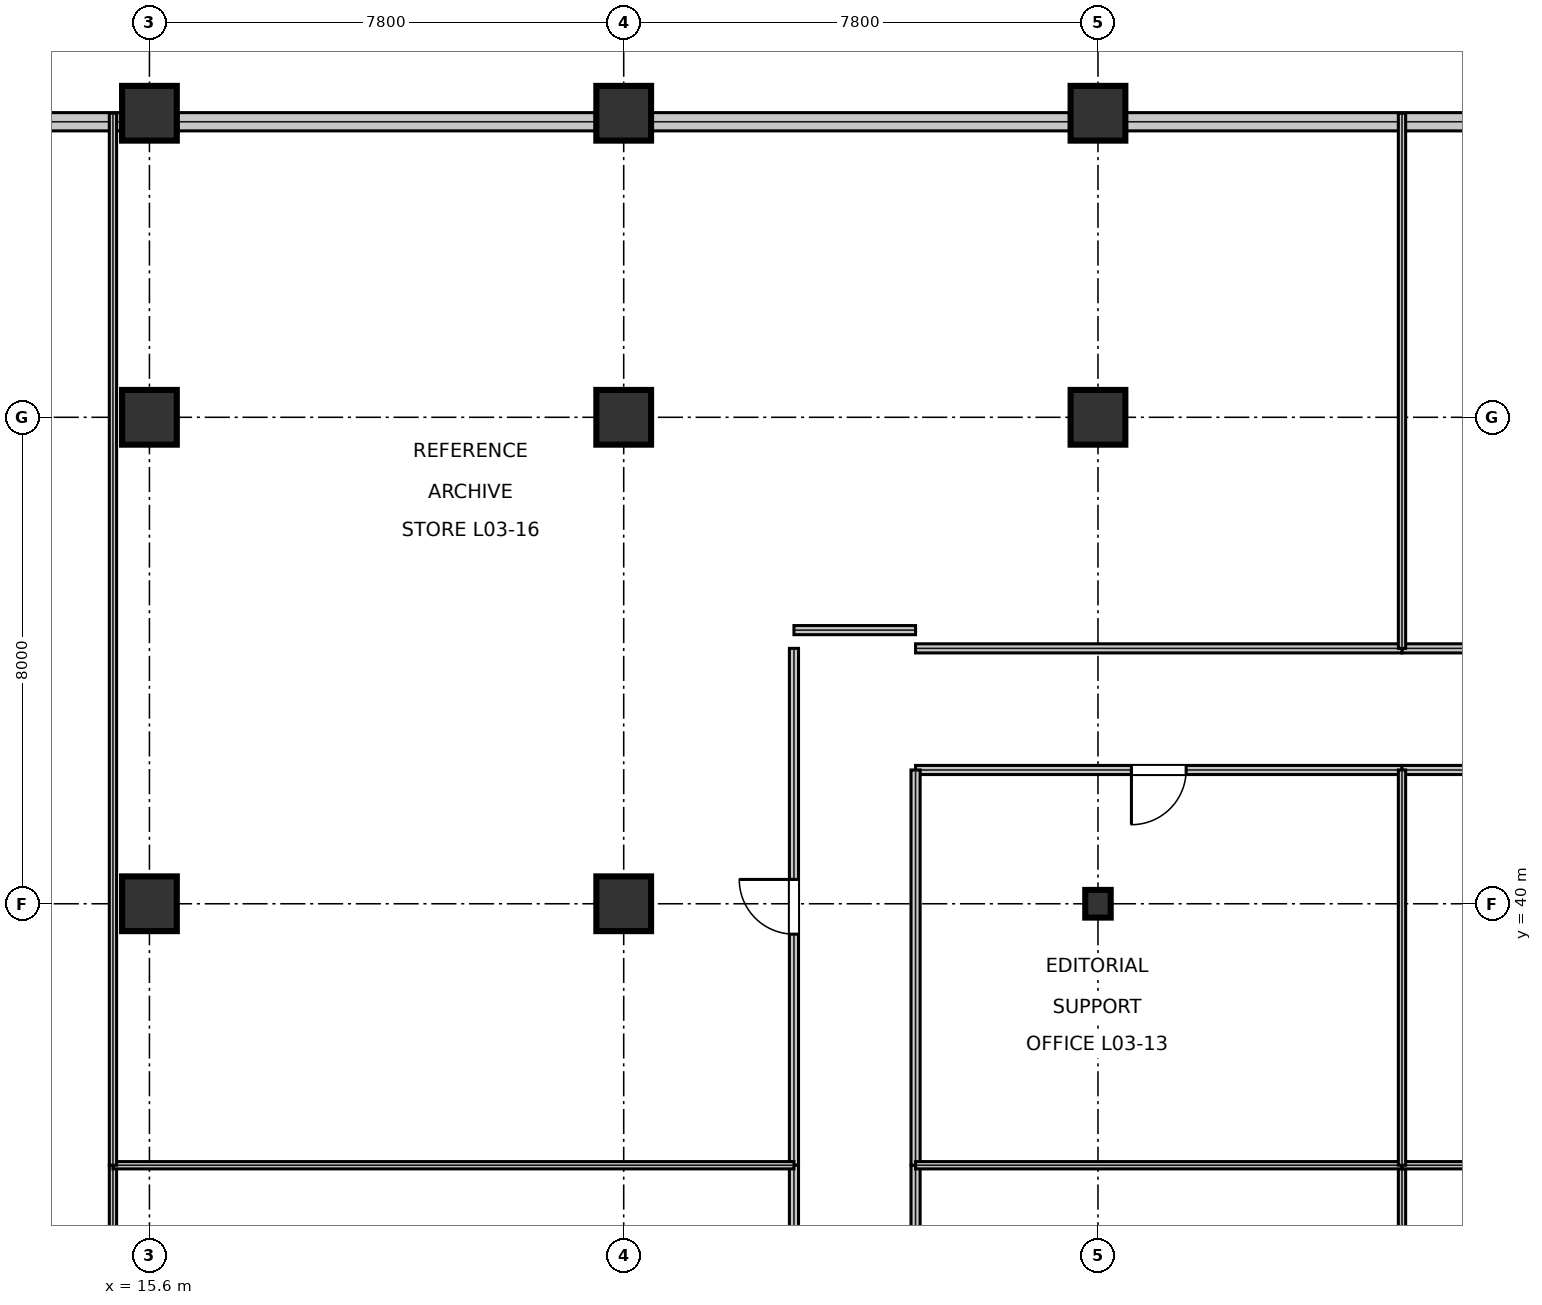
"""IFC4 building model, lengths in metres.
Left out: names, types, materials, properties, quantities, classifications, styles, units other than length and angle.
Written with IfcOpenShell. Run it as: python <this file> out.ifc"""

import sys

from ifc_helpers import new_model, si_unit, direction, frame, frame_2d, origin, origin_2d, place, context, subcontext, project, spatial, rectangle, i_section, extrude, element, fill, save


model = new_model("IFC4")
c1 = context("Model", 3, precision=1e-05, world=origin(), true_north=direction((0.0, 1.0)))
c2 = subcontext(c1, "Body", "Model", "MODEL_VIEW")
j1 = project(units=[si_unit("LENGTHUNIT", "METRE"), si_unit("PLANEANGLEUNIT", "RADIAN")], contexts=[c1])
p1 = place(None, origin())
s1 = spatial("IfcSite", under=j1, at=p1, CompositionType="ELEMENT")
p2 = place(p1, origin())
s2 = spatial("IfcBuilding", under=s1, at=p2, CompositionType="ELEMENT")
p3 = place(p2, frame((0.0, 0.0, 16.2)))
s3 = spatial("IfcBuildingStorey", under=s2, at=p3, CompositionType="ELEMENT", Elevation=16.2)
for number, where, z_axis, x_axis in (
    (1, (15.6, 40.0, 0.0), (0.0, 0.0, 1.0), (1.0, 0.0, 0.0)),
    (2, (15.6, 48.0, 0.0), (0.0, 0.0, 1.0), (1.0, 0.0, 0.0)),
    (3, (15.6, 53.0, 0.0), (0.0, 0.0, 1.0), (1.0, 0.0, 0.0)),
    (4, (23.4, 40.0, 0.0), (0.0, 0.0, 1.0), (1.0, 0.0, 0.0)),
    (5, (23.4, 48.0, 0.0), (0.0, 0.0, 1.0), (1.0, 0.0, 0.0)),
    (6, (23.4, 53.0, 0.0), (0.0, 0.0, 1.0), (1.0, 0.0, 0.0)),
):
    element("IfcColumn", number, at=place(p3, frame(where, z_axis=z_axis, x_axis=x_axis)), inside=s3, PredefinedType="COLUMN", context=c2, shape_type="SweptSolid", body=[
        extrude(rectangle(XDim=0.9, YDim=0.9, at=origin_2d()), origin(), (0.0, 0.0, 1.0), 5.395),
    ])
p4 = place(p3, frame((31.2, 40.0, 0.0), z_axis=(0.0, 0.0, 1.0), x_axis=(1.0, 0.0, 0.0)))
e7 = element("IfcColumn", 7, at=p4, inside=s3, PredefinedType="COLUMN", context=c2, shape_type="SweptSolid", body=[
    extrude(i_section(OverallWidth=0.418, OverallDepth=0.455, WebThickness=0.042, FlangeThickness=0.068, at=origin_2d()), origin(), (0.0, 0.0, 1.0), 5.395),
])
for number, where, z_axis, x_axis in (
    (8, (31.2, 48.0, 0.0), (0.0, 0.0, 1.0), (1.0, 0.0, 0.0)),
    (9, (31.2, 53.0, 0.0), (0.0, 0.0, 1.0), (1.0, 0.0, 0.0)),
):
    element("IfcColumn", number, at=place(p3, frame(where, z_axis=z_axis, x_axis=x_axis)), inside=s3, PredefinedType="COLUMN", context=c2, shape_type="SweptSolid", body=[
        extrude(rectangle(XDim=0.9, YDim=0.9, at=origin_2d()), origin(), (0.0, 0.0, 1.0), 5.395),
    ])
for number, where, z_axis, x_axis in (
    (10, (38.532, 52.86, 0.0), (0.0, 0.0, 1.0), (-1.0, 0.0, 0.0)),
    (11, (30.732, 52.86, 0.0), (0.0, 0.0, 1.0), (-1.0, 0.0, 0.0)),
):
    element("IfcWall", number, at=place(p3, frame(where, z_axis=z_axis, x_axis=x_axis)), inside=s3, PredefinedType="STANDARD", context=c2, shape_type="SweptSolid", body=[
        extrude(rectangle(XDim=6.864, YDim=0.3, at=frame_2d((3.432, 0.0))), origin(), (0.0, 0.0, 1.0), 4.648),
    ])
p5 = place(p3, frame((22.932, 52.86, 0.0), z_axis=(0.0, 0.0, 1.0), x_axis=(-1.0, 0.0, 0.0)))
e12 = element("IfcWall", 12, at=p5, inside=s3, PredefinedType="STANDARD", context=c2, shape_type="SweptSolid", body=[
    extrude(rectangle(XDim=6.864, YDim=0.3, at=frame_2d((3.432, 0.0))), origin(), (0.0, 0.0, 1.0), 4.648),
])
p6 = place(p3, frame((15.132, 52.86, 0.0), z_axis=(0.0, 0.0, 1.0), x_axis=(-1.0, 0.0, 0.0)))
e13 = element("IfcWall", 13, at=p6, inside=s3, PredefinedType="STANDARD", context=c2, shape_type="SweptSolid", body=[
    extrude(rectangle(XDim=6.864, YDim=0.3, at=frame_2d((3.432, 0.0))), origin(), (0.0, 0.0, 1.0), 4.648),
])
p7 = place(p3, frame((28.2, 42.2, 0.0), z_axis=(0.0, 0.0, 1.0), x_axis=(1.0, 0.0, 0.0)))
e14 = element("IfcWall", 14, at=p7, inside=s3, PredefinedType="PARTITIONING", context=c2, shape_type="SweptSolid", body=[
    extrude(rectangle(XDim=8.0, YDim=0.15, at=frame_2d((4.0, 0.0))), origin(), (0.0, 0.0, 1.0), 4.415),
])
p8 = place(p7, frame((3.55, 0.0, 0.0)))
e15 = element("IfcOpeningElement", 15, at=p8, cuts=e14, PredefinedType="OPENING", context=c2, shape_type="SweptSolid", body=[
    extrude(rectangle(XDim=0.9, YDim=2.15, at=frame_2d((0.45, 1.075))), frame((0.0, 0.085, 0.0), z_axis=(0.0, -1.0, 0.0), x_axis=(1.0, 0.0, 0.0)), (0.0, 0.0, 1.0), 0.17),
])
p9 = place(p3, frame((36.2, 42.2, 0.0), z_axis=(0.0, 0.0, 1.0), x_axis=(1.0, 0.0, 0.0)))
e16 = element("IfcWall", 16, at=p9, inside=s3, PredefinedType="PARTITIONING", context=c2, shape_type="SweptSolid", body=[
    extrude(rectangle(XDim=10.6, YDim=0.15, at=frame_2d((5.3, 0.0))), origin(), (0.0, 0.0, 1.0), 4.415),
])
p10 = place(p9, frame((4.85, 0.0, 0.0)))
e17 = element("IfcOpeningElement", 17, at=p10, cuts=e16, PredefinedType="OPENING", context=c2, shape_type="SweptSolid", body=[
    extrude(rectangle(XDim=0.9, YDim=2.15, at=frame_2d((0.45, 1.075))), frame((0.0, 0.085, 0.0), z_axis=(0.0, -1.0, 0.0), x_axis=(1.0, 0.0, 0.0)), (0.0, 0.0, 1.0), 0.17),
])
p11 = place(p3, frame((26.2, 35.7, 0.0), z_axis=(0.0, 0.0, 1.0), x_axis=(0.0, 1.0, 0.0)))
e18 = element("IfcWall", 18, at=p11, inside=s3, PredefinedType="PARTITIONING", context=c2, shape_type="SweptSolid", body=[
    extrude(rectangle(XDim=8.5, YDim=0.15, at=frame_2d((4.25, 0.0))), origin(), (0.0, 0.0, 1.0), 4.338),
])
p12 = place(p11, frame((3.8, 0.0, 0.0)))
e19 = element("IfcOpeningElement", 19, at=p12, cuts=e18, PredefinedType="OPENING", context=c2, shape_type="SweptSolid", body=[
    extrude(rectangle(XDim=0.9, YDim=2.15, at=frame_2d((0.45, 1.075))), frame((0.0, 0.085, 0.0), z_axis=(0.0, -1.0, 0.0), x_axis=(1.0, 0.0, 0.0)), (0.0, 0.0, 1.0), 0.17),
])
p13 = place(p3, frame((36.2, 44.2, 0.0), z_axis=(0.0, 0.0, 1.0), x_axis=(1.0, 0.0, 0.0)))
e20 = element("IfcWall", 20, at=p13, inside=s3, PredefinedType="PARTITIONING", context=c2, shape_type="SweptSolid", body=[
    extrude(rectangle(XDim=10.6, YDim=0.15, at=frame_2d((5.3, 0.0))), origin(), (0.0, 0.0, 1.0), 4.415),
])
p14 = place(p13, frame((4.85, 0.0, 0.0)))
e21 = element("IfcOpeningElement", 21, at=p14, cuts=e20, PredefinedType="OPENING", context=c2, shape_type="SweptSolid", body=[
    extrude(rectangle(XDim=0.9, YDim=2.15, at=frame_2d((0.45, 1.075))), frame((0.0, 0.085, 0.0), z_axis=(0.0, -1.0, 0.0), x_axis=(1.0, 0.0, 0.0)), (0.0, 0.0, 1.0), 0.17),
])
for number, where, z_axis, x_axis in (
    (22, (26.2, 28.2, 0.0), (0.0, 0.0, 1.0), (0.0, 1.0, 0.0)),
    (23, (28.2, 28.2, 0.0), (0.0, 0.0, 1.0), (0.0, 1.0, 0.0)),
):
    element("IfcWall", number, at=place(p3, frame(where, z_axis=z_axis, x_axis=x_axis)), inside=s3, PredefinedType="PARTITIONING", context=c2, shape_type="SweptSolid", body=[
        extrude(rectangle(XDim=7.5, YDim=0.15, at=frame_2d((3.75, 0.0))), origin(), (0.0, 0.0, 1.0), 4.338),
    ])
p15 = place(p3, frame((28.2, 35.7, 0.0), z_axis=(0.0, 0.0, 1.0), x_axis=(0.0, 1.0, 0.0)))
e24 = element("IfcWall", 24, at=p15, inside=s3, PredefinedType="PARTITIONING", context=c2, shape_type="SweptSolid", body=[
    extrude(rectangle(XDim=6.5, YDim=0.15, at=frame_2d((3.25, 0.0))), origin(), (0.0, 0.0, 1.0), 4.338),
])
p16 = place(p3, frame((28.2, 44.2, 0.0), z_axis=(0.0, 0.0, 1.0), x_axis=(1.0, 0.0, 0.0)))
e25 = element("IfcWall", 25, at=p16, inside=s3, PredefinedType="PARTITIONING", context=c2, shape_type="SweptSolid", body=[
    extrude(rectangle(XDim=8.0, YDim=0.15, at=frame_2d((4.0, 0.0))), origin(), (0.0, 0.0, 1.0), 4.415),
])
p17 = place(p3, frame((26.2, 44.5, 0.0), z_axis=(0.0, 0.0, 1.0), x_axis=(1.0, 0.0, 0.0)))
e26 = element("IfcWall", 26, at=p17, inside=s3, PredefinedType="PARTITIONING", context=c2, shape_type="SweptSolid", body=[
    extrude(rectangle(XDim=2.0, YDim=0.15, at=frame_2d((1.0, 0.0))), origin(), (0.0, 0.0, 1.0), 4.701),
])
p18 = place(p3, frame((15.0, 28.2, 0.0), z_axis=(0.0, 0.0, 1.0), x_axis=(0.0, 1.0, 0.0)))
e27 = element("IfcWall", 27, at=p18, inside=s3, PredefinedType="PARTITIONING", context=c2, shape_type="SweptSolid", body=[
    extrude(rectangle(XDim=7.5, YDim=0.12, at=frame_2d((3.75, 0.0))), origin(), (0.0, 0.0, 1.0), 3.688),
])
p19 = place(p3, frame((15.0, 35.7, 0.0), z_axis=(0.0, 0.0, 1.0), x_axis=(1.0, 0.0, 0.0)))
e28 = element("IfcWall", 28, at=p19, inside=s3, PredefinedType="PARTITIONING", context=c2, shape_type="SweptSolid", body=[
    extrude(rectangle(XDim=11.2, YDim=0.12, at=frame_2d((5.6, 0.0))), origin(), (0.0, 0.0, 1.0), 3.688),
])
p20 = place(p3, frame((36.2, 28.2, 0.0), z_axis=(0.0, 0.0, 1.0), x_axis=(0.0, 1.0, 0.0)))
e29 = element("IfcWall", 29, at=p20, inside=s3, PredefinedType="PARTITIONING", context=c2, shape_type="SweptSolid", body=[
    extrude(rectangle(XDim=7.5, YDim=0.12, at=frame_2d((3.75, 0.0))), origin(), (0.0, 0.0, 1.0), 4.338),
])
p21 = place(p3, frame((28.2, 35.7, 0.0), z_axis=(0.0, 0.0, 1.0), x_axis=(1.0, 0.0, 0.0)))
e30 = element("IfcWall", 30, at=p21, inside=s3, PredefinedType="PARTITIONING", context=c2, shape_type="SweptSolid", body=[
    extrude(rectangle(XDim=8.0, YDim=0.12, at=frame_2d((4.0, 0.0))), origin(), (0.0, 0.0, 1.0), 4.415),
])
p22 = place(p3, frame((36.2, 35.7, 0.0), z_axis=(0.0, 0.0, 1.0), x_axis=(1.0, 0.0, 0.0)))
e31 = element("IfcWall", 31, at=p22, inside=s3, PredefinedType="PARTITIONING", context=c2, shape_type="SweptSolid", body=[
    extrude(rectangle(XDim=3.9, YDim=0.12, at=frame_2d((1.95, 0.0))), origin(), (0.0, 0.0, 1.0), 4.415),
])
p23 = place(p3, frame((15.0, 35.7, 0.0), z_axis=(0.0, 0.0, 1.0), x_axis=(0.0, 1.0, 0.0)))
e32 = element("IfcWall", 32, at=p23, inside=s3, PredefinedType="PARTITIONING", context=c2, shape_type="SweptSolid", body=[
    extrude(rectangle(XDim=17.3, YDim=0.12, at=frame_2d((8.65, 0.0))), origin(), (0.0, 0.0, 1.0), 4.338),
])
p24 = place(p3, frame((36.2, 35.7, 0.0), z_axis=(0.0, 0.0, 1.0), x_axis=(0.0, 1.0, 0.0)))
e33 = element("IfcWall", 33, at=p24, inside=s3, PredefinedType="PARTITIONING", context=c2, shape_type="SweptSolid", body=[
    extrude(rectangle(XDim=6.5, YDim=0.12, at=frame_2d((3.25, 0.0))), origin(), (0.0, 0.0, 1.0), 4.338),
])
p25 = place(p3, frame((36.2, 44.2, 0.0), z_axis=(0.0, 0.0, 1.0), x_axis=(0.0, 1.0, 0.0)))
e34 = element("IfcWall", 34, at=p25, inside=s3, PredefinedType="PARTITIONING", context=c2, shape_type="SweptSolid", body=[
    extrude(rectangle(XDim=8.8, YDim=0.12, at=frame_2d((4.4, 0.0))), origin(), (0.0, 0.0, 1.0), 4.338),
])
p26 = place(p8, frame((0.9, 0.0, 0.0), z_axis=(0.0, 0.0, 1.0), x_axis=(-1.0, 0.0, 0.0)))
e35 = element("IfcDoor", 35, at=p26, inside=s3, OperationType="SINGLE_SWING_RIGHT", PredefinedType="DOOR", context=c2, shape_type="SweptSolid", body=[
    extrude(rectangle(XDim=0.9, YDim=2.15, at=frame_2d((0.45, 1.075))), frame((0.0, 0.025, 0.0), z_axis=(0.0, -1.0, 0.0), x_axis=(1.0, 0.0, 0.0)), (0.0, 0.0, 1.0), 0.05),
])
fill(e15, e35)
p27 = place(p12, origin())
e36 = element("IfcDoor", 36, at=p27, inside=s3, OperationType="SINGLE_SWING_RIGHT", PredefinedType="DOOR", context=c2, shape_type="SweptSolid", body=[
    extrude(rectangle(XDim=0.9, YDim=2.15, at=frame_2d((0.45, 1.075))), frame((0.0, 0.025, 0.0), z_axis=(0.0, -1.0, 0.0), x_axis=(1.0, 0.0, 0.0)), (0.0, 0.0, 1.0), 0.05),
])
fill(e19, e36)
save(model, sys.argv[1])
